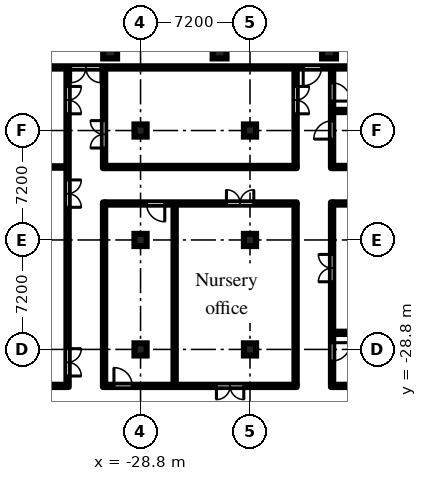
"""IFC4 building model, lengths in metres.
Left out: names, types, materials, properties, quantities, classifications, styles, units other than length and angle.
Written with IfcOpenShell. Run it as: python <this file> out.ifc"""

import sys

from ifc_helpers import new_model, si_unit, direction, frame, frame_2d, origin, origin_2d, place, context, subcontext, project, spatial, rectangle, hollow_circle, extrude, element, fill, save


model = new_model("IFC4")
c1 = context("Model", 3, precision=1e-05, world=origin(), true_north=direction((0.0, 1.0)))
c2 = subcontext(c1, "Body", "Model", "MODEL_VIEW")
j1 = project(units=[si_unit("LENGTHUNIT", "METRE"), si_unit("PLANEANGLEUNIT", "RADIAN")], contexts=[c1])
p1 = place(None, origin())
s1 = spatial("IfcSite", under=j1, at=p1, CompositionType="ELEMENT")
p2 = place(p1, origin())
s2 = spatial("IfcBuilding", under=s1, at=p2, CompositionType="ELEMENT")
p3 = place(p2, origin())
s3 = spatial("IfcBuildingStorey", under=s2, at=p3, CompositionType="ELEMENT", Elevation=0.0)
for number, where, z_axis, x_axis in (
    (1, (-28.8, -28.8, 0.0), (0.0, 0.0, 1.0), (1.0, 0.0, 0.0)),
    (2, (-28.8, -21.6, 0.0), (0.0, 0.0, 1.0), (1.0, 0.0, 0.0)),
    (3, (-28.8, -14.4, 0.0), (0.0, 0.0, 1.0), (1.0, 0.0, 0.0)),
    (4, (-21.6, -28.8, 0.0), (0.0, 0.0, 1.0), (1.0, 0.0, 0.0)),
    (5, (-21.6, -21.6, 0.0), (0.0, 0.0, 1.0), (1.0, 0.0, 0.0)),
    (6, (-21.6, -14.4, 0.0), (0.0, 0.0, 1.0), (1.0, 0.0, 0.0)),
):
    element("IfcColumn", number, at=place(p3, frame(where, z_axis=z_axis, x_axis=x_axis)), inside=s3, PredefinedType="COLUMN", context=c2, shape_type="SweptSolid", body=[
        extrude(rectangle(XDim=0.8, YDim=0.8, at=origin_2d()), origin(), (0.0, 0.0, 1.0), 6.6),
    ])
for number, where, z_axis, x_axis in (
    (7, (-30.8, -9.2, 0.0), (0.0, 0.0, 1.0), (1.0, 0.0, 0.0)),
    (8, (-23.6, -9.2, 0.0), (0.0, 0.0, 1.0), (1.0, 0.0, 0.0)),
    (9, (-16.4, -9.2, 0.0), (0.0, 0.0, 1.0), (1.0, 0.0, 0.0)),
):
    element("IfcColumn", number, at=place(p3, frame(where, z_axis=z_axis, x_axis=x_axis)), inside=s3, PredefinedType="COLUMN", context=c2, shape_type="SweptSolid", body=[
        extrude(hollow_circle(Radius=0.457, WallThickness=0.05, at=origin_2d()), origin(), (0.0, 0.0, 1.0), 7.5),
    ])
p4 = place(p3, frame((-50.22, -31.2, 0.0), z_axis=(0.0, 0.0, 1.0), x_axis=(1.0, 0.0, 0.0)))
e10 = element("IfcWall", 10, at=p4, inside=s3, PredefinedType="PARTITIONING", context=c2, shape_type="SweptSolid", body=[
    extrude(rectangle(XDim=16.545, YDim=0.15, at=frame_2d((8.272, 0.0))), origin(), (0.0, 0.0, 1.0), 6.6),
])
p5 = place(p4, frame((0.77, 0.0, 0.0)))
e11 = element("IfcOpeningElement", 11, at=p5, cuts=e10, PredefinedType="OPENING", context=c2, shape_type="SweptSolid", body=[
    extrude(rectangle(XDim=1.8, YDim=2.1, at=frame_2d((0.9, 1.05))), frame((0.0, 0.085, 0.0), z_axis=(0.0, -1.0, 0.0), x_axis=(1.0, 0.0, 0.0)), (0.0, 0.0, 1.0), 0.17),
])
p6 = place(p3, frame((-50.22, -16.8, 0.0), z_axis=(0.0, 0.0, 1.0), x_axis=(1.0, 0.0, 0.0)))
e12 = element("IfcWall", 12, at=p6, inside=s3, PredefinedType="PARTITIONING", context=c2, shape_type="SweptSolid", body=[
    extrude(rectangle(XDim=16.545, YDim=0.1, at=frame_2d((8.272, 0.0))), origin(), (0.0, 0.0, 1.0), 6.6),
])
p7 = place(p3, frame((-50.22, -10.25, 0.0), z_axis=(0.0, 0.0, 1.0), x_axis=(1.0, 0.0, 0.0)))
e13 = element("IfcWall", 13, at=p7, inside=s3, PredefinedType="PARTITIONING", context=c2, shape_type="SweptSolid", body=[
    extrude(rectangle(XDim=37.695, YDim=0.15, at=frame_2d((18.848, 0.0))), origin(), (0.0, 0.0, 1.0), 6.6),
])
p8 = place(p7, frame((16.82, 0.0, 0.0)))
e14 = element("IfcOpeningElement", 14, at=p8, cuts=e13, PredefinedType="OPENING", context=c2, shape_type="SweptSolid", body=[
    extrude(rectangle(XDim=2.0, YDim=2.1, at=frame_2d((1.0, 1.05))), frame((0.0, 0.085, 0.0), z_axis=(0.0, -1.0, 0.0), x_axis=(1.0, 0.0, 0.0)), (0.0, 0.0, 1.0), 0.17),
])
p9 = place(p7, frame((32.12, 0.0, 0.0)))
e15 = element("IfcOpeningElement", 15, at=p9, cuts=e13, PredefinedType="OPENING", context=c2, shape_type="SweptSolid", body=[
    extrude(rectangle(XDim=1.2, YDim=2.1, at=frame_2d((0.6, 1.05))), frame((0.0, 0.085, 0.0), z_axis=(0.0, -1.0, 0.0), x_axis=(1.0, 0.0, 0.0)), (0.0, 0.0, 1.0), 0.17),
])
p10 = place(p3, frame((-33.6, -31.275, 0.0), z_axis=(0.0, 0.0, 1.0), x_axis=(0.0, 1.0, 0.0)))
e16 = element("IfcWall", 16, at=p10, inside=s3, PredefinedType="PARTITIONING", context=c2, shape_type="SweptSolid", body=[
    extrude(rectangle(XDim=20.95, YDim=0.15, at=frame_2d((10.475, 0.0))), origin(), (0.0, 0.0, 1.0), 6.6),
])
p11 = place(p10, frame((17.975, 0.0, 0.0)))
e17 = element("IfcOpeningElement", 17, at=p11, cuts=e16, PredefinedType="OPENING", context=c2, shape_type="SweptSolid", body=[
    extrude(rectangle(XDim=1.8, YDim=2.1, at=frame_2d((0.9, 1.05))), frame((0.0, 0.085, 0.0), z_axis=(0.0, -1.0, 0.0), x_axis=(1.0, 0.0, 0.0)), (0.0, 0.0, 1.0), 0.17),
])
p12 = place(p10, frame((0.725, 0.0, 0.0)))
e18 = element("IfcOpeningElement", 18, at=p12, cuts=e16, PredefinedType="OPENING", context=c2, shape_type="SweptSolid", body=[
    extrude(rectangle(XDim=1.8, YDim=2.1, at=frame_2d((0.9, 1.05))), frame((0.0, 0.085, 0.0), z_axis=(0.0, -1.0, 0.0), x_axis=(1.0, 0.0, 0.0)), (0.0, 0.0, 1.0), 0.17),
])
p13 = place(p10, frame((11.825, 0.0, 0.0)))
e19 = element("IfcOpeningElement", 19, at=p13, cuts=e16, PredefinedType="OPENING", context=c2, shape_type="SweptSolid", body=[
    extrude(rectangle(XDim=1.8, YDim=2.1, at=frame_2d((0.9, 1.05))), frame((0.0, 0.085, 0.0), z_axis=(0.0, -1.0, 0.0), x_axis=(1.0, 0.0, 0.0)), (0.0, 0.0, 1.0), 0.17),
])
p14 = place(p3, frame((-31.2, -31.275, 0.0), z_axis=(0.0, 0.0, 1.0), x_axis=(0.0, 1.0, 0.0)))
e20 = element("IfcWall", 20, at=p14, inside=s3, PredefinedType="PARTITIONING", context=c2, shape_type="SweptSolid", body=[
    extrude(rectangle(XDim=12.15, YDim=0.15, at=frame_2d((6.075, 0.0))), origin(), (0.0, 0.0, 1.0), 6.6),
])
p15 = place(p3, frame((-31.125, -31.2, 0.0), z_axis=(0.0, 0.0, 1.0), x_axis=(1.0, 0.0, 0.0)))
e21 = element("IfcWall", 21, at=p15, inside=s3, PredefinedType="PARTITIONING", context=c2, shape_type="SweptSolid", body=[
    extrude(rectangle(XDim=12.6, YDim=0.15, at=frame_2d((6.3, 0.0))), origin(), (0.0, 0.0, 1.0), 6.6),
])
p16 = place(p15, frame((0.575, 0.0, 0.0)))
e22 = element("IfcOpeningElement", 22, at=p16, cuts=e21, PredefinedType="OPENING", context=c2, shape_type="SweptSolid", body=[
    extrude(rectangle(XDim=1.2, YDim=2.1, at=frame_2d((0.6, 1.05))), frame((0.0, 0.085, 0.0), z_axis=(0.0, -1.0, 0.0), x_axis=(1.0, 0.0, 0.0)), (0.0, 0.0, 1.0), 0.17),
])
p17 = place(p15, frame((7.318, 0.0, 0.0)))
e23 = element("IfcOpeningElement", 23, at=p17, cuts=e21, PredefinedType="OPENING", context=c2, shape_type="SweptSolid", body=[
    extrude(rectangle(XDim=1.8, YDim=2.1, at=frame_2d((0.9, 1.05))), frame((0.0, 0.085, 0.0), z_axis=(0.0, -1.0, 0.0), x_axis=(1.0, 0.0, 0.0)), (0.0, 0.0, 1.0), 0.17),
])
p18 = place(p3, frame((-31.125, -19.2, 0.0), z_axis=(0.0, 0.0, 1.0), x_axis=(1.0, 0.0, 0.0)))
e24 = element("IfcWall", 24, at=p18, inside=s3, PredefinedType="PARTITIONING", context=c2, shape_type="SweptSolid", body=[
    extrude(rectangle(XDim=12.6, YDim=0.15, at=frame_2d((6.3, 0.0))), origin(), (0.0, 0.0, 1.0), 6.6),
])
p19 = place(p18, frame((2.718, 0.0, 0.0)))
e25 = element("IfcOpeningElement", 25, at=p19, cuts=e24, PredefinedType="OPENING", context=c2, shape_type="SweptSolid", body=[
    extrude(rectangle(XDim=1.2, YDim=2.1, at=frame_2d((0.6, 1.05))), frame((0.0, 0.085, 0.0), z_axis=(0.0, -1.0, 0.0), x_axis=(1.0, 0.0, 0.0)), (0.0, 0.0, 1.0), 0.17),
])
p20 = place(p18, frame((7.975, 0.0, 0.0)))
e26 = element("IfcOpeningElement", 26, at=p20, cuts=e24, PredefinedType="OPENING", context=c2, shape_type="SweptSolid", body=[
    extrude(rectangle(XDim=1.8, YDim=2.1, at=frame_2d((0.9, 1.05))), frame((0.0, 0.085, 0.0), z_axis=(0.0, -1.0, 0.0), x_axis=(1.0, 0.0, 0.0)), (0.0, 0.0, 1.0), 0.17),
])
p21 = place(p3, frame((-31.2, -16.875, 0.0), z_axis=(0.0, 0.0, 1.0), x_axis=(0.0, 1.0, 0.0)))
e27 = element("IfcWall", 27, at=p21, inside=s3, PredefinedType="PARTITIONING", context=c2, shape_type="SweptSolid", body=[
    extrude(rectangle(XDim=6.55, YDim=0.15, at=frame_2d((3.275, 0.0))), origin(), (0.0, 0.0, 1.0), 6.6),
])
p22 = place(p21, frame((1.325, 0.0, 0.0)))
e28 = element("IfcOpeningElement", 28, at=p22, cuts=e27, PredefinedType="OPENING", context=c2, shape_type="SweptSolid", body=[
    extrude(rectangle(XDim=1.8, YDim=2.1, at=frame_2d((0.9, 1.05))), frame((0.0, 0.085, 0.0), z_axis=(0.0, -1.0, 0.0), x_axis=(1.0, 0.0, 0.0)), (0.0, 0.0, 1.0), 0.17),
])
p23 = place(p3, frame((-31.125, -16.8, 0.0), z_axis=(0.0, 0.0, 1.0), x_axis=(1.0, 0.0, 0.0)))
e29 = element("IfcWall", 29, at=p23, inside=s3, PredefinedType="PARTITIONING", context=c2, shape_type="SweptSolid", body=[
    extrude(rectangle(XDim=12.6, YDim=0.15, at=frame_2d((6.3, 0.0))), origin(), (0.0, 0.0, 1.0), 6.6),
])
for number, where, z_axis, x_axis in (
    (30, (-26.557, -31.125, 0.0), (0.0, 0.0, 1.0), (0.0, 1.0, 0.0)),
    (31, (-18.6, -31.125, 0.0), (0.0, 0.0, 1.0), (0.0, 1.0, 0.0)),
):
    element("IfcWall", number, at=place(p3, frame(where, z_axis=z_axis, x_axis=x_axis)), inside=s3, PredefinedType="PARTITIONING", context=c2, shape_type="SweptSolid", body=[
        extrude(rectangle(XDim=11.85, YDim=0.15, at=frame_2d((5.925, 0.0))), origin(), (0.0, 0.0, 1.0), 6.6),
    ])
p24 = place(p3, frame((-18.6, -16.725, 0.0), z_axis=(0.0, 0.0, 1.0), x_axis=(0.0, 1.0, 0.0)))
e32 = element("IfcWall", 32, at=p24, inside=s3, PredefinedType="PARTITIONING", context=c2, shape_type="SweptSolid", body=[
    extrude(rectangle(XDim=6.4, YDim=0.15, at=frame_2d((3.2, 0.0))), origin(), (0.0, 0.0, 1.0), 6.6),
])
p25 = place(p24, frame((3.425, 0.0, 0.0)))
e33 = element("IfcOpeningElement", 33, at=p25, cuts=e32, PredefinedType="OPENING", context=c2, shape_type="SweptSolid", body=[
    extrude(rectangle(XDim=1.8, YDim=2.1, at=frame_2d((0.9, 1.05))), frame((0.0, 0.085, 0.0), z_axis=(0.0, -1.0, 0.0), x_axis=(1.0, 0.0, 0.0)), (0.0, 0.0, 1.0), 0.17),
])
p26 = place(p3, frame((-16.2, -31.275, 0.0), z_axis=(0.0, 0.0, 1.0), x_axis=(0.0, 1.0, 0.0)))
e34 = element("IfcWall", 34, at=p26, inside=s3, PredefinedType="PARTITIONING", context=c2, shape_type="SweptSolid", body=[
    extrude(rectangle(XDim=12.15, YDim=0.15, at=frame_2d((6.075, 0.0))), origin(), (0.0, 0.0, 1.0), 6.6),
])
p27 = place(p26, frame((1.717, 0.0, 0.0)))
e35 = element("IfcOpeningElement", 35, at=p27, cuts=e34, PredefinedType="OPENING", context=c2, shape_type="SweptSolid", body=[
    extrude(rectangle(XDim=1.2, YDim=2.1, at=frame_2d((0.6, 1.05))), frame((0.0, 0.085, 0.0), z_axis=(0.0, -1.0, 0.0), x_axis=(1.0, 0.0, 0.0)), (0.0, 0.0, 1.0), 0.17),
])
p28 = place(p26, frame((6.925, 0.0, 0.0)))
e36 = element("IfcOpeningElement", 36, at=p28, cuts=e34, PredefinedType="OPENING", context=c2, shape_type="SweptSolid", body=[
    extrude(rectangle(XDim=1.8, YDim=2.1, at=frame_2d((0.9, 1.05))), frame((0.0, 0.085, 0.0), z_axis=(0.0, -1.0, 0.0), x_axis=(1.0, 0.0, 0.0)), (0.0, 0.0, 1.0), 0.17),
])
p29 = place(p3, frame((-16.125, -31.2, 0.0), z_axis=(0.0, 0.0, 1.0), x_axis=(1.0, 0.0, 0.0)))
e37 = element("IfcWall", 37, at=p29, inside=s3, PredefinedType="PARTITIONING", context=c2, shape_type="SweptSolid", body=[
    extrude(rectangle(XDim=6.604, YDim=0.15, at=frame_2d((3.302, 0.0))), origin(), (0.0, 0.0, 1.0), 6.6),
])
for number, where, z_axis, x_axis in (
    (38, (-16.125, -27.708, 0.0), (0.0, 0.0, 1.0), (1.0, 0.0, 0.0)),
    (39, (-16.125, -19.2, 0.0), (0.0, 0.0, 1.0), (1.0, 0.0, 0.0)),
):
    element("IfcWall", number, at=place(p3, frame(where, z_axis=z_axis, x_axis=x_axis)), inside=s3, PredefinedType="PARTITIONING", context=c2, shape_type="SweptSolid", body=[
        extrude(rectangle(XDim=8.85, YDim=0.15, at=frame_2d((4.425, 0.0))), origin(), (0.0, 0.0, 1.0), 6.6),
    ])
p30 = place(p3, frame((-16.2, -16.875, 0.0), z_axis=(0.0, 0.0, 1.0), x_axis=(0.0, 1.0, 0.0)))
e40 = element("IfcWall", 40, at=p30, inside=s3, PredefinedType="PARTITIONING", context=c2, shape_type="SweptSolid", body=[
    extrude(rectangle(XDim=6.55, YDim=0.15, at=frame_2d((3.275, 0.0))), origin(), (0.0, 0.0, 1.0), 6.6),
])
p31 = place(p30, frame((1.911, 0.0, 0.0)))
e41 = element("IfcOpeningElement", 41, at=p31, cuts=e40, PredefinedType="OPENING", context=c2, shape_type="SweptSolid", body=[
    extrude(rectangle(XDim=1.2, YDim=2.1, at=frame_2d((0.6, 1.05))), frame((0.0, 0.085, 0.0), z_axis=(0.0, -1.0, 0.0), x_axis=(1.0, 0.0, 0.0)), (0.0, 0.0, 1.0), 0.17),
])
p32 = place(p30, frame((4.411, 0.0, 0.0)))
e42 = element("IfcOpeningElement", 42, at=p32, cuts=e40, PredefinedType="OPENING", context=c2, shape_type="SweptSolid", body=[
    extrude(rectangle(XDim=1.2, YDim=2.1, at=frame_2d((0.6, 1.05))), frame((0.0, 0.085, 0.0), z_axis=(0.0, -1.0, 0.0), x_axis=(1.0, 0.0, 0.0)), (0.0, 0.0, 1.0), 0.17),
])
p33 = place(p3, frame((-16.125, -16.8, 0.0), z_axis=(0.0, 0.0, 1.0), x_axis=(1.0, 0.0, 0.0)))
e43 = element("IfcWall", 43, at=p33, inside=s3, PredefinedType="PARTITIONING", context=c2, shape_type="SweptSolid", body=[
    extrude(rectangle(XDim=6.604, YDim=0.15, at=frame_2d((3.302, 0.0))), origin(), (0.0, 0.0, 1.0), 6.6),
])
p34 = place(p3, frame((-16.125, -13.114, 0.0), z_axis=(0.0, 0.0, 1.0), x_axis=(1.0, 0.0, 0.0)))
e44 = element("IfcWall", 44, at=p34, inside=s3, PredefinedType="PARTITIONING", context=c2, shape_type="SweptSolid", body=[
    extrude(rectangle(XDim=8.85, YDim=0.15, at=frame_2d((4.425, 0.0))), origin(), (0.0, 0.0, 1.0), 6.6),
])
p35 = place(p8, frame((2.0, 0.0, 0.0), z_axis=(0.0, 0.0, 1.0), x_axis=(-1.0, 0.0, 0.0)))
e45 = element("IfcDoor", 45, at=p35, inside=s3, OperationType="DOUBLE_DOOR_DOUBLE_SWING", PredefinedType="DOOR", context=c2, shape_type="SweptSolid", body=[
    extrude(rectangle(XDim=2.0, YDim=2.1, at=frame_2d((1.0, 1.05))), frame((0.0, 0.025, 0.0), z_axis=(0.0, -1.0, 0.0), x_axis=(1.0, 0.0, 0.0)), (0.0, 0.0, 1.0), 0.05),
])
fill(e14, e45)
p36 = place(p9, frame((1.2, 0.0, 0.0), z_axis=(0.0, 0.0, 1.0), x_axis=(-1.0, 0.0, 0.0)))
e46 = element("IfcDoor", 46, at=p36, inside=s3, OperationType="SINGLE_SWING_RIGHT", PredefinedType="DOOR", context=c2, shape_type="SweptSolid", body=[
    extrude(rectangle(XDim=1.2, YDim=2.1, at=frame_2d((0.6, 1.05))), frame((0.0, 0.025, 0.0), z_axis=(0.0, -1.0, 0.0), x_axis=(1.0, 0.0, 0.0)), (0.0, 0.0, 1.0), 0.05),
])
fill(e15, e46)
p37 = place(p31, origin())
e47 = element("IfcDoor", 47, at=p37, inside=s3, OperationType="SINGLE_SWING_LEFT", PredefinedType="DOOR", context=c2, shape_type="SweptSolid", body=[
    extrude(rectangle(XDim=1.2, YDim=2.1, at=frame_2d((0.6, 1.05))), frame((0.0, 0.025, 0.0), z_axis=(0.0, -1.0, 0.0), x_axis=(1.0, 0.0, 0.0)), (0.0, 0.0, 1.0), 0.05),
])
fill(e41, e47)
p38 = place(p32, frame((1.2, 0.0, 0.0), z_axis=(0.0, 0.0, 1.0), x_axis=(-1.0, 0.0, 0.0)))
e48 = element("IfcDoor", 48, at=p38, inside=s3, OperationType="SINGLE_SWING_RIGHT", PredefinedType="DOOR", context=c2, shape_type="SweptSolid", body=[
    extrude(rectangle(XDim=1.2, YDim=2.1, at=frame_2d((0.6, 1.05))), frame((0.0, 0.025, 0.0), z_axis=(0.0, -1.0, 0.0), x_axis=(1.0, 0.0, 0.0)), (0.0, 0.0, 1.0), 0.05),
])
fill(e42, e48)
p39 = place(p22, origin())
e49 = element("IfcDoor", 49, at=p39, inside=s3, OperationType="DOUBLE_DOOR_DOUBLE_SWING", PredefinedType="DOOR", context=c2, shape_type="SweptSolid", body=[
    extrude(rectangle(XDim=1.8, YDim=2.1, at=frame_2d((0.9, 1.05))), frame((0.0, 0.025, 0.0), z_axis=(0.0, -1.0, 0.0), x_axis=(1.0, 0.0, 0.0)), (0.0, 0.0, 1.0), 0.05),
])
fill(e28, e49)
p40 = place(p25, frame((1.8, 0.0, 0.0), z_axis=(0.0, 0.0, 1.0), x_axis=(-1.0, 0.0, 0.0)))
e50 = element("IfcDoor", 50, at=p40, inside=s3, OperationType="DOUBLE_DOOR_DOUBLE_SWING", PredefinedType="DOOR", context=c2, shape_type="SweptSolid", body=[
    extrude(rectangle(XDim=1.8, YDim=2.1, at=frame_2d((0.9, 1.05))), frame((0.0, 0.025, 0.0), z_axis=(0.0, -1.0, 0.0), x_axis=(1.0, 0.0, 0.0)), (0.0, 0.0, 1.0), 0.05),
])
fill(e33, e50)
p41 = place(p27, frame((1.2, 0.0, 0.0), z_axis=(0.0, 0.0, 1.0), x_axis=(-1.0, 0.0, 0.0)))
e51 = element("IfcDoor", 51, at=p41, inside=s3, OperationType="SINGLE_SWING_LEFT", PredefinedType="DOOR", context=c2, shape_type="SweptSolid", body=[
    extrude(rectangle(XDim=1.2, YDim=2.1, at=frame_2d((0.6, 1.05))), frame((0.0, 0.025, 0.0), z_axis=(0.0, -1.0, 0.0), x_axis=(1.0, 0.0, 0.0)), (0.0, 0.0, 1.0), 0.05),
])
fill(e35, e51)
p42 = place(p28, origin())
e52 = element("IfcDoor", 52, at=p42, inside=s3, OperationType="DOUBLE_DOOR_DOUBLE_SWING", PredefinedType="DOOR", context=c2, shape_type="SweptSolid", body=[
    extrude(rectangle(XDim=1.8, YDim=2.1, at=frame_2d((0.9, 1.05))), frame((0.0, 0.025, 0.0), z_axis=(0.0, -1.0, 0.0), x_axis=(1.0, 0.0, 0.0)), (0.0, 0.0, 1.0), 0.05),
])
fill(e36, e52)
p43 = place(p16, origin())
e53 = element("IfcDoor", 53, at=p43, inside=s3, OperationType="SINGLE_SWING_LEFT", PredefinedType="DOOR", context=c2, shape_type="SweptSolid", body=[
    extrude(rectangle(XDim=1.2, YDim=2.1, at=frame_2d((0.6, 1.05))), frame((0.0, 0.025, 0.0), z_axis=(0.0, -1.0, 0.0), x_axis=(1.0, 0.0, 0.0)), (0.0, 0.0, 1.0), 0.05),
])
fill(e22, e53)
p44 = place(p19, frame((1.2, 0.0, 0.0), z_axis=(0.0, 0.0, 1.0), x_axis=(-1.0, 0.0, 0.0)))
e54 = element("IfcDoor", 54, at=p44, inside=s3, OperationType="SINGLE_SWING_LEFT", PredefinedType="DOOR", context=c2, shape_type="SweptSolid", body=[
    extrude(rectangle(XDim=1.2, YDim=2.1, at=frame_2d((0.6, 1.05))), frame((0.0, 0.025, 0.0), z_axis=(0.0, -1.0, 0.0), x_axis=(1.0, 0.0, 0.0)), (0.0, 0.0, 1.0), 0.05),
])
fill(e25, e54)
p45 = place(p17, frame((1.8, 0.0, 0.0), z_axis=(0.0, 0.0, 1.0), x_axis=(-1.0, 0.0, 0.0)))
e55 = element("IfcDoor", 55, at=p45, inside=s3, OperationType="DOUBLE_DOOR_DOUBLE_SWING", PredefinedType="DOOR", context=c2, shape_type="SweptSolid", body=[
    extrude(rectangle(XDim=1.8, YDim=2.1, at=frame_2d((0.9, 1.05))), frame((0.0, 0.025, 0.0), z_axis=(0.0, -1.0, 0.0), x_axis=(1.0, 0.0, 0.0)), (0.0, 0.0, 1.0), 0.05),
])
fill(e23, e55)
p46 = place(p20, origin())
e56 = element("IfcDoor", 56, at=p46, inside=s3, OperationType="DOUBLE_DOOR_DOUBLE_SWING", PredefinedType="DOOR", context=c2, shape_type="SweptSolid", body=[
    extrude(rectangle(XDim=1.8, YDim=2.1, at=frame_2d((0.9, 1.05))), frame((0.0, 0.025, 0.0), z_axis=(0.0, -1.0, 0.0), x_axis=(1.0, 0.0, 0.0)), (0.0, 0.0, 1.0), 0.05),
])
fill(e26, e56)
p47 = place(p11, frame((1.8, 0.0, 0.0), z_axis=(0.0, 0.0, 1.0), x_axis=(-1.0, 0.0, 0.0)))
e57 = element("IfcDoor", 57, at=p47, inside=s3, OperationType="DOUBLE_DOOR_DOUBLE_SWING", PredefinedType="DOOR", context=c2, shape_type="SweptSolid", body=[
    extrude(rectangle(XDim=1.8, YDim=2.1, at=frame_2d((0.9, 1.05))), frame((0.0, 0.025, 0.0), z_axis=(0.0, -1.0, 0.0), x_axis=(1.0, 0.0, 0.0)), (0.0, 0.0, 1.0), 0.05),
])
fill(e17, e57)
p48 = place(p12, frame((1.8, 0.0, 0.0), z_axis=(0.0, 0.0, 1.0), x_axis=(-1.0, 0.0, 0.0)))
e58 = element("IfcDoor", 58, at=p48, inside=s3, OperationType="DOUBLE_DOOR_DOUBLE_SWING", PredefinedType="DOOR", context=c2, shape_type="SweptSolid", body=[
    extrude(rectangle(XDim=1.8, YDim=2.1, at=frame_2d((0.9, 1.05))), frame((0.0, 0.025, 0.0), z_axis=(0.0, -1.0, 0.0), x_axis=(1.0, 0.0, 0.0)), (0.0, 0.0, 1.0), 0.05),
])
fill(e18, e58)
p49 = place(p13, frame((1.8, 0.0, 0.0), z_axis=(0.0, 0.0, 1.0), x_axis=(-1.0, 0.0, 0.0)))
e59 = element("IfcDoor", 59, at=p49, inside=s3, OperationType="DOUBLE_DOOR_DOUBLE_SWING", PredefinedType="DOOR", context=c2, shape_type="SweptSolid", body=[
    extrude(rectangle(XDim=1.8, YDim=2.1, at=frame_2d((0.9, 1.05))), frame((0.0, 0.025, 0.0), z_axis=(0.0, -1.0, 0.0), x_axis=(1.0, 0.0, 0.0)), (0.0, 0.0, 1.0), 0.05),
])
fill(e19, e59)
save(model, sys.argv[1])
